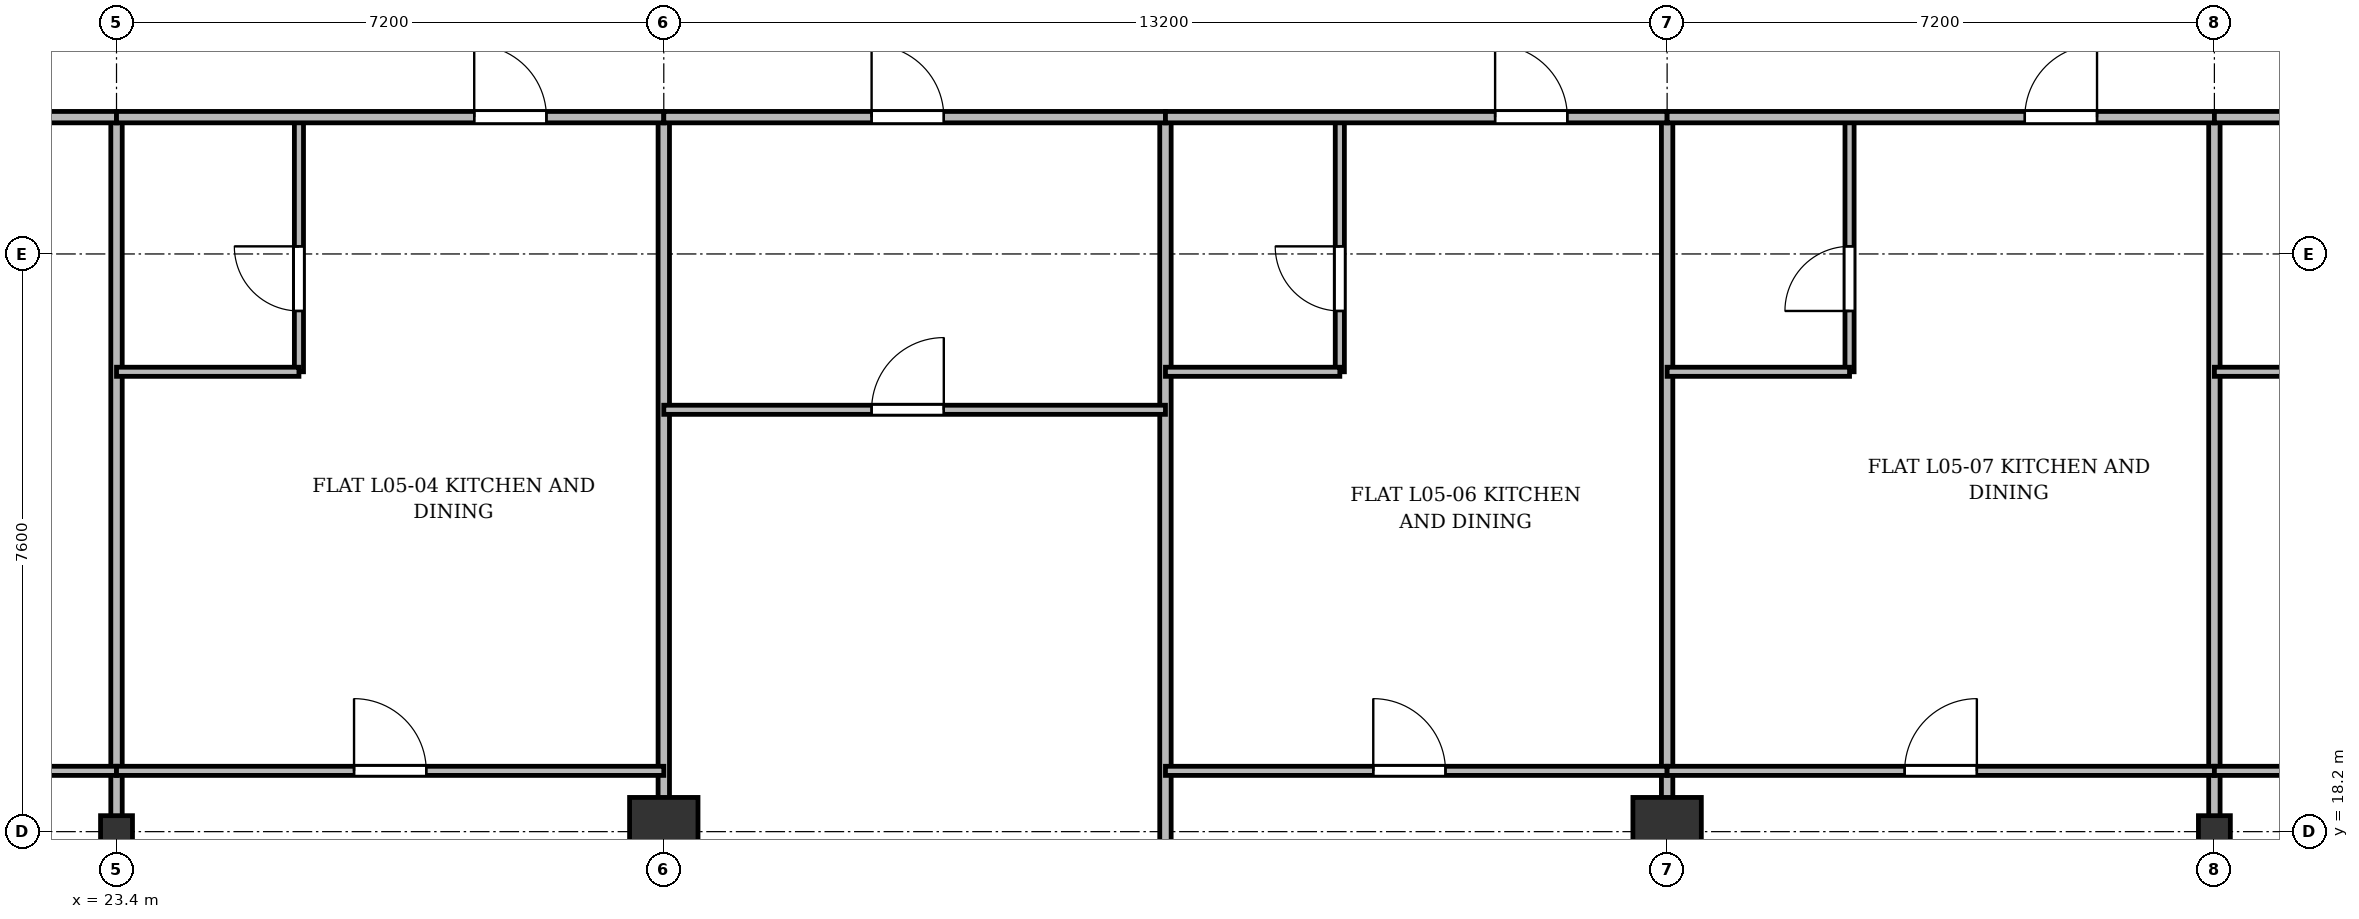
"""IFC4 building model, lengths in metres.
Left out: names, types, materials, properties, quantities, classifications, styles, units other than length and angle.
Written with IfcOpenShell. Run it as: python <this file> out.ifc"""

import sys

from ifc_helpers import new_model, si_unit, direction, frame, frame_2d, origin, origin_2d, place, context, subcontext, project, spatial, rectangle, i_section, extrude, source, transform, mapped, element, fill, save


model = new_model("IFC4")
c1 = context("Model", 3, precision=1e-05, world=origin(), true_north=direction((0.0, 1.0)))
c2 = subcontext(c1, "Body", "Model", "MODEL_VIEW")
j1 = project(units=[si_unit("LENGTHUNIT", "METRE"), si_unit("PLANEANGLEUNIT", "RADIAN")], contexts=[c1])
p1 = place(None, origin())
s1 = spatial("IfcSite", under=j1, at=p1, CompositionType="ELEMENT")
p2 = place(p1, origin())
s2 = spatial("IfcBuilding", under=s1, at=p2, CompositionType="ELEMENT")
p3 = place(p2, frame((0.0, 0.0, 23.5)))
s3 = spatial("IfcBuildingStorey", under=s2, at=p3, CompositionType="ELEMENT", Elevation=23.5)
m1 = source(origin(), c2, "Body", "SweptSolid", [
    extrude(i_section(OverallWidth=0.42, OverallDepth=0.42, WebThickness=0.026, FlangeThickness=0.04, at=origin_2d()), origin(), (0.0, 0.0, 1.0), 3.6),
])
p4 = place(p3, frame((23.4, 18.2, 0.0), z_axis=(0.0, 0.0, 1.0), x_axis=(1.0, 0.0, 0.0)))
e1 = element("IfcColumn", 1, at=p4, inside=s3, PredefinedType="COLUMN", context=c2, shape_type="MappedRepresentation", body=[
    mapped(m1, transform((0.0, 0.0, 0.0), x_axis=(1.0, 0.0, 0.0), y_axis=(0.0, 1.0, 0.0), z_axis=(0.0, 0.0, 1.0), scale=1.0)),
])
m2 = source(origin(), c2, "Body", "SweptSolid", [
    extrude(rectangle(XDim=0.9, YDim=0.9, at=origin_2d()), origin(), (0.0, 0.0, 1.0), 3.6),
])
for number, where, z_axis, x_axis in (
    (2, (30.6, 18.2, 0.0), (0.0, 0.0, 1.0), (1.0, 0.0, 0.0)),
    (3, (43.8, 18.2, 0.0), (0.0, 0.0, 1.0), (1.0, 0.0, 0.0)),
):
    element("IfcColumn", number, at=place(p3, frame(where, z_axis=z_axis, x_axis=x_axis)), inside=s3, PredefinedType="COLUMN", context=c2, shape_type="MappedRepresentation", body=[
        mapped(m2, transform((0.0, 0.0, 0.0), x_axis=(1.0, 0.0, 0.0), y_axis=(0.0, 1.0, 0.0), z_axis=(0.0, 0.0, 1.0), scale=1.0)),
    ])
p5 = place(p3, frame((51.0, 18.2, 0.0), z_axis=(0.0, 0.0, 1.0), x_axis=(1.0, 0.0, 0.0)))
e4 = element("IfcColumn", 4, at=p5, inside=s3, PredefinedType="COLUMN", context=c2, shape_type="MappedRepresentation", body=[
    mapped(m1, transform((0.0, 0.0, 0.0), x_axis=(1.0, 0.0, 0.0), y_axis=(0.0, 1.0, 0.0), z_axis=(0.0, 0.0, 1.0), scale=1.0)),
])
for number, where, z_axis, x_axis in (
    (5, (23.4, 3.145, 0.0), (0.0, 0.0, 1.0), (0.0, 1.0, 0.0)),
    (6, (30.6, 3.145, 0.0), (0.0, 0.0, 1.0), (0.0, 1.0, 0.0)),
):
    element("IfcWall", number, at=place(p3, frame(where, z_axis=z_axis, x_axis=x_axis)), inside=s3, PredefinedType="PARTITIONING", context=c2, shape_type="SweptSolid", body=[
        extrude(rectangle(XDim=24.455, YDim=0.15, at=frame_2d((12.228, 0.0))), origin(), (0.0, 0.0, 1.0), 2.752),
    ])
p6 = place(p3, frame((37.2, 3.145, 0.0), z_axis=(0.0, 0.0, 1.0), x_axis=(0.0, 1.0, 0.0)))
e7 = element("IfcWall", 7, at=p6, inside=s3, PredefinedType="PARTITIONING", context=c2, shape_type="SweptSolid", body=[
    extrude(rectangle(XDim=24.455, YDim=0.15, at=frame_2d((12.228, 0.0))), origin(), (0.0, 0.0, 1.0), 2.69),
])
for number, where, z_axis, x_axis in (
    (8, (43.8, 3.145, 0.0), (0.0, 0.0, 1.0), (0.0, 1.0, 0.0)),
    (9, (51.0, 3.145, 0.0), (0.0, 0.0, 1.0), (0.0, 1.0, 0.0)),
):
    element("IfcWall", number, at=place(p3, frame(where, z_axis=z_axis, x_axis=x_axis)), inside=s3, PredefinedType="PARTITIONING", context=c2, shape_type="SweptSolid", body=[
        extrude(rectangle(XDim=24.455, YDim=0.15, at=frame_2d((12.228, 0.0))), origin(), (0.0, 0.0, 1.0), 2.752),
    ])
p7 = place(p3, frame((15.6, 19.0, 0.0), z_axis=(0.0, 0.0, 1.0), x_axis=(1.0, 0.0, 0.0)))
e10 = element("IfcWall", 10, at=p7, inside=s3, PredefinedType="PARTITIONING", context=c2, shape_type="SweptSolid", body=[
    extrude(rectangle(XDim=7.8, YDim=0.12, at=frame_2d((3.9, 0.0))), origin(), (0.0, 0.0, 1.0), 2.752),
])
p8 = place(p7, frame((3.333, 0.0, 0.0)))
e11 = element("IfcOpeningElement", 11, at=p8, cuts=e10, PredefinedType="OPENING", context=c2, shape_type="SweptSolid", body=[
    extrude(rectangle(XDim=0.95, YDim=2.15, at=frame_2d((0.475, 1.075))), frame((0.0, 0.07, 0.0), z_axis=(0.0, -1.0, 0.0), x_axis=(1.0, 0.0, 0.0)), (0.0, 0.0, 1.0), 0.14),
])
p9 = place(p3, frame((15.6, 27.6, 0.0), z_axis=(0.0, 0.0, 1.0), x_axis=(1.0, 0.0, 0.0)))
e12 = element("IfcWall", 12, at=p9, inside=s3, PredefinedType="PARTITIONING", context=c2, shape_type="SweptSolid", body=[
    extrude(rectangle(XDim=7.8, YDim=0.15, at=frame_2d((3.9, 0.0))), origin(), (0.0, 0.0, 1.0), 2.752),
])
p10 = place(p9, frame((5.172, 0.0, 0.0)))
e13 = element("IfcOpeningElement", 13, at=p10, cuts=e12, PredefinedType="OPENING", context=c2, shape_type="SweptSolid", body=[
    extrude(rectangle(XDim=0.95, YDim=2.15, at=frame_2d((0.475, 1.075))), frame((0.0, 0.085, 0.0), z_axis=(0.0, -1.0, 0.0), x_axis=(1.0, 0.0, 0.0)), (0.0, 0.0, 1.0), 0.17),
])
p11 = place(p3, frame((23.4, 19.0, 0.0), z_axis=(0.0, 0.0, 1.0), x_axis=(1.0, 0.0, 0.0)))
e14 = element("IfcWall", 14, at=p11, inside=s3, PredefinedType="PARTITIONING", context=c2, shape_type="SweptSolid", body=[
    extrude(rectangle(XDim=7.2, YDim=0.12, at=frame_2d((3.6, 0.0))), origin(), (0.0, 0.0, 1.0), 2.752),
])
p12 = place(p11, frame((3.125, 0.0, 0.0)))
e15 = element("IfcOpeningElement", 15, at=p12, cuts=e14, PredefinedType="OPENING", context=c2, shape_type="SweptSolid", body=[
    extrude(rectangle(XDim=0.95, YDim=2.15, at=frame_2d((0.475, 1.075))), frame((0.0, 0.07, 0.0), z_axis=(0.0, -1.0, 0.0), x_axis=(1.0, 0.0, 0.0)), (0.0, 0.0, 1.0), 0.14),
])
p13 = place(p3, frame((25.8, 24.25, 0.0), z_axis=(0.0, 0.0, 1.0), x_axis=(0.0, 1.0, 0.0)))
e16 = element("IfcWall", 16, at=p13, inside=s3, PredefinedType="PARTITIONING", context=c2, shape_type="SweptSolid", body=[
    extrude(rectangle(XDim=3.35, YDim=0.12, at=frame_2d((1.675, 0.0))), origin(), (0.0, 0.0, 1.0), 2.94),
])
p14 = place(p13, frame((0.8, 0.0, 0.0)))
e17 = element("IfcOpeningElement", 17, at=p14, cuts=e16, PredefinedType="OPENING", context=c2, shape_type="SweptSolid", body=[
    extrude(rectangle(XDim=0.85, YDim=2.1, at=frame_2d((0.425, 1.05))), frame((0.0, 0.07, 0.0), z_axis=(0.0, -1.0, 0.0), x_axis=(1.0, 0.0, 0.0)), (0.0, 0.0, 1.0), 0.14),
])
p15 = place(p3, frame((23.4, 24.25, 0.0), z_axis=(0.0, 0.0, 1.0), x_axis=(1.0, 0.0, 0.0)))
e18 = element("IfcWall", 18, at=p15, inside=s3, PredefinedType="PARTITIONING", context=c2, shape_type="SweptSolid", body=[
    extrude(rectangle(XDim=2.4, YDim=0.12, at=frame_2d((1.2, 0.0))), origin(), (0.0, 0.0, 1.0), 2.752),
])
p16 = place(p3, frame((23.4, 27.6, 0.0), z_axis=(0.0, 0.0, 1.0), x_axis=(1.0, 0.0, 0.0)))
e19 = element("IfcWall", 19, at=p16, inside=s3, PredefinedType="PARTITIONING", context=c2, shape_type="SweptSolid", body=[
    extrude(rectangle(XDim=7.2, YDim=0.15, at=frame_2d((3.6, 0.0))), origin(), (0.0, 0.0, 1.0), 2.752),
])
p17 = place(p16, frame((4.706, 0.0, 0.0)))
e20 = element("IfcOpeningElement", 20, at=p17, cuts=e19, PredefinedType="OPENING", context=c2, shape_type="SweptSolid", body=[
    extrude(rectangle(XDim=0.95, YDim=2.15, at=frame_2d((0.475, 1.075))), frame((0.0, 0.085, 0.0), z_axis=(0.0, -1.0, 0.0), x_axis=(1.0, 0.0, 0.0)), (0.0, 0.0, 1.0), 0.17),
])
p18 = place(p3, frame((30.6, 27.6, 0.0), z_axis=(0.0, 0.0, 1.0), x_axis=(1.0, 0.0, 0.0)))
e21 = element("IfcWall", 21, at=p18, inside=s3, PredefinedType="PARTITIONING", context=c2, shape_type="SweptSolid", body=[
    extrude(rectangle(XDim=6.6, YDim=0.15, at=frame_2d((3.3, 0.0))), origin(), (0.0, 0.0, 1.0), 2.752),
])
p19 = place(p18, frame((2.734, 0.0, 0.0)))
e22 = element("IfcOpeningElement", 22, at=p19, cuts=e21, PredefinedType="OPENING", context=c2, shape_type="SweptSolid", body=[
    extrude(rectangle(XDim=0.95, YDim=2.15, at=frame_2d((0.475, 1.075))), frame((0.0, 0.085, 0.0), z_axis=(0.0, -1.0, 0.0), x_axis=(1.0, 0.0, 0.0)), (0.0, 0.0, 1.0), 0.17),
])
p20 = place(p3, frame((30.6, 23.75, 0.0), z_axis=(0.0, 0.0, 1.0), x_axis=(1.0, 0.0, 0.0)))
e23 = element("IfcWall", 23, at=p20, inside=s3, PredefinedType="PARTITIONING", context=c2, shape_type="SweptSolid", body=[
    extrude(rectangle(XDim=6.6, YDim=0.12, at=frame_2d((3.3, 0.0))), origin(), (0.0, 0.0, 1.0), 2.752),
])
p21 = place(p20, frame((2.734, 0.0, 0.0)))
e24 = element("IfcOpeningElement", 24, at=p21, cuts=e23, PredefinedType="OPENING", context=c2, shape_type="SweptSolid", body=[
    extrude(rectangle(XDim=0.95, YDim=2.15, at=frame_2d((0.475, 1.075))), frame((0.0, 0.07, 0.0), z_axis=(0.0, -1.0, 0.0), x_axis=(1.0, 0.0, 0.0)), (0.0, 0.0, 1.0), 0.14),
])
p22 = place(p3, frame((37.2, 19.0, 0.0), z_axis=(0.0, 0.0, 1.0), x_axis=(1.0, 0.0, 0.0)))
e25 = element("IfcWall", 25, at=p22, inside=s3, PredefinedType="PARTITIONING", context=c2, shape_type="SweptSolid", body=[
    extrude(rectangle(XDim=6.6, YDim=0.12, at=frame_2d((3.3, 0.0))), origin(), (0.0, 0.0, 1.0), 2.752),
])
p23 = place(p22, frame((2.734, 0.0, 0.0)))
e26 = element("IfcOpeningElement", 26, at=p23, cuts=e25, PredefinedType="OPENING", context=c2, shape_type="SweptSolid", body=[
    extrude(rectangle(XDim=0.95, YDim=2.15, at=frame_2d((0.475, 1.075))), frame((0.0, 0.07, 0.0), z_axis=(0.0, -1.0, 0.0), x_axis=(1.0, 0.0, 0.0)), (0.0, 0.0, 1.0), 0.14),
])
p24 = place(p3, frame((39.494, 24.25, 0.0), z_axis=(0.0, 0.0, 1.0), x_axis=(0.0, 1.0, 0.0)))
e27 = element("IfcWall", 27, at=p24, inside=s3, PredefinedType="PARTITIONING", context=c2, shape_type="SweptSolid", body=[
    extrude(rectangle(XDim=3.35, YDim=0.12, at=frame_2d((1.675, 0.0))), origin(), (0.0, 0.0, 1.0), 2.94),
])
p25 = place(p24, frame((0.8, 0.0, 0.0)))
e28 = element("IfcOpeningElement", 28, at=p25, cuts=e27, PredefinedType="OPENING", context=c2, shape_type="SweptSolid", body=[
    extrude(rectangle(XDim=0.85, YDim=2.1, at=frame_2d((0.425, 1.05))), frame((0.0, 0.07, 0.0), z_axis=(0.0, -1.0, 0.0), x_axis=(1.0, 0.0, 0.0)), (0.0, 0.0, 1.0), 0.14),
])
p26 = place(p3, frame((37.2, 24.25, 0.0), z_axis=(0.0, 0.0, 1.0), x_axis=(1.0, 0.0, 0.0)))
e29 = element("IfcWall", 29, at=p26, inside=s3, PredefinedType="PARTITIONING", context=c2, shape_type="SweptSolid", body=[
    extrude(rectangle(XDim=2.294, YDim=0.12, at=frame_2d((1.147, 0.0))), origin(), (0.0, 0.0, 1.0), 3.34),
])
p27 = place(p3, frame((37.2, 27.6, 0.0), z_axis=(0.0, 0.0, 1.0), x_axis=(1.0, 0.0, 0.0)))
e30 = element("IfcWall", 30, at=p27, inside=s3, PredefinedType="PARTITIONING", context=c2, shape_type="SweptSolid", body=[
    extrude(rectangle(XDim=6.6, YDim=0.15, at=frame_2d((3.3, 0.0))), origin(), (0.0, 0.0, 1.0), 2.752),
])
p28 = place(p27, frame((4.337, 0.0, 0.0)))
e31 = element("IfcOpeningElement", 31, at=p28, cuts=e30, PredefinedType="OPENING", context=c2, shape_type="SweptSolid", body=[
    extrude(rectangle(XDim=0.95, YDim=2.15, at=frame_2d((0.475, 1.075))), frame((0.0, 0.085, 0.0), z_axis=(0.0, -1.0, 0.0), x_axis=(1.0, 0.0, 0.0)), (0.0, 0.0, 1.0), 0.17),
])
p29 = place(p3, frame((43.8, 19.0, 0.0), z_axis=(0.0, 0.0, 1.0), x_axis=(1.0, 0.0, 0.0)))
e32 = element("IfcWall", 32, at=p29, inside=s3, PredefinedType="PARTITIONING", context=c2, shape_type="SweptSolid", body=[
    extrude(rectangle(XDim=7.2, YDim=0.12, at=frame_2d((3.6, 0.0))), origin(), (0.0, 0.0, 1.0), 2.752),
])
p30 = place(p29, frame((3.125, 0.0, 0.0)))
e33 = element("IfcOpeningElement", 33, at=p30, cuts=e32, PredefinedType="OPENING", context=c2, shape_type="SweptSolid", body=[
    extrude(rectangle(XDim=0.95, YDim=2.15, at=frame_2d((0.475, 1.075))), frame((0.0, 0.07, 0.0), z_axis=(0.0, -1.0, 0.0), x_axis=(1.0, 0.0, 0.0)), (0.0, 0.0, 1.0), 0.14),
])
p31 = place(p3, frame((46.2, 24.25, 0.0), z_axis=(0.0, 0.0, 1.0), x_axis=(0.0, 1.0, 0.0)))
e34 = element("IfcWall", 34, at=p31, inside=s3, PredefinedType="PARTITIONING", context=c2, shape_type="SweptSolid", body=[
    extrude(rectangle(XDim=3.35, YDim=0.12, at=frame_2d((1.675, 0.0))), origin(), (0.0, 0.0, 1.0), 2.94),
])
p32 = place(p31, frame((0.8, 0.0, 0.0)))
e35 = element("IfcOpeningElement", 35, at=p32, cuts=e34, PredefinedType="OPENING", context=c2, shape_type="SweptSolid", body=[
    extrude(rectangle(XDim=0.85, YDim=2.1, at=frame_2d((0.425, 1.05))), frame((0.0, 0.07, 0.0), z_axis=(0.0, -1.0, 0.0), x_axis=(1.0, 0.0, 0.0)), (0.0, 0.0, 1.0), 0.14),
])
p33 = place(p3, frame((43.8, 24.25, 0.0), z_axis=(0.0, 0.0, 1.0), x_axis=(1.0, 0.0, 0.0)))
e36 = element("IfcWall", 36, at=p33, inside=s3, PredefinedType="PARTITIONING", context=c2, shape_type="SweptSolid", body=[
    extrude(rectangle(XDim=2.4, YDim=0.12, at=frame_2d((1.2, 0.0))), origin(), (0.0, 0.0, 1.0), 2.752),
])
p34 = place(p3, frame((43.8, 27.6, 0.0), z_axis=(0.0, 0.0, 1.0), x_axis=(1.0, 0.0, 0.0)))
e37 = element("IfcWall", 37, at=p34, inside=s3, PredefinedType="PARTITIONING", context=c2, shape_type="SweptSolid", body=[
    extrude(rectangle(XDim=7.2, YDim=0.15, at=frame_2d((3.6, 0.0))), origin(), (0.0, 0.0, 1.0), 2.752),
])
p35 = place(p34, frame((4.706, 0.0, 0.0)))
e38 = element("IfcOpeningElement", 38, at=p35, cuts=e37, PredefinedType="OPENING", context=c2, shape_type="SweptSolid", body=[
    extrude(rectangle(XDim=0.95, YDim=2.15, at=frame_2d((0.475, 1.075))), frame((0.0, 0.085, 0.0), z_axis=(0.0, -1.0, 0.0), x_axis=(1.0, 0.0, 0.0)), (0.0, 0.0, 1.0), 0.17),
])
p36 = place(p3, frame((51.0, 19.0, 0.0), z_axis=(0.0, 0.0, 1.0), x_axis=(1.0, 0.0, 0.0)))
e39 = element("IfcWall", 39, at=p36, inside=s3, PredefinedType="PARTITIONING", context=c2, shape_type="SweptSolid", body=[
    extrude(rectangle(XDim=7.8, YDim=0.12, at=frame_2d((3.9, 0.0))), origin(), (0.0, 0.0, 1.0), 2.752),
])
p37 = place(p36, frame((3.333, 0.0, 0.0)))
e40 = element("IfcOpeningElement", 40, at=p37, cuts=e39, PredefinedType="OPENING", context=c2, shape_type="SweptSolid", body=[
    extrude(rectangle(XDim=0.95, YDim=2.15, at=frame_2d((0.475, 1.075))), frame((0.0, 0.07, 0.0), z_axis=(0.0, -1.0, 0.0), x_axis=(1.0, 0.0, 0.0)), (0.0, 0.0, 1.0), 0.14),
])
p38 = place(p3, frame((51.0, 24.25, 0.0), z_axis=(0.0, 0.0, 1.0), x_axis=(1.0, 0.0, 0.0)))
e41 = element("IfcWall", 41, at=p38, inside=s3, PredefinedType="PARTITIONING", context=c2, shape_type="SweptSolid", body=[
    extrude(rectangle(XDim=2.4, YDim=0.12, at=frame_2d((1.2, 0.0))), origin(), (0.0, 0.0, 1.0), 2.752),
])
p39 = place(p3, frame((51.0, 27.6, 0.0), z_axis=(0.0, 0.0, 1.0), x_axis=(1.0, 0.0, 0.0)))
e42 = element("IfcWall", 42, at=p39, inside=s3, PredefinedType="PARTITIONING", context=c2, shape_type="SweptSolid", body=[
    extrude(rectangle(XDim=7.8, YDim=0.15, at=frame_2d((3.9, 0.0))), origin(), (0.0, 0.0, 1.0), 2.752),
])
p40 = place(p39, frame((5.172, 0.0, 0.0)))
e43 = element("IfcOpeningElement", 43, at=p40, cuts=e42, PredefinedType="OPENING", context=c2, shape_type="SweptSolid", body=[
    extrude(rectangle(XDim=0.95, YDim=2.15, at=frame_2d((0.475, 1.075))), frame((0.0, 0.085, 0.0), z_axis=(0.0, -1.0, 0.0), x_axis=(1.0, 0.0, 0.0)), (0.0, 0.0, 1.0), 0.17),
])
m3 = source(origin(), c2, "Body", "SweptSolid", [
    extrude(rectangle(XDim=0.95, YDim=2.15, at=frame_2d((0.475, 1.075))), frame((0.0, 0.025, 0.0), z_axis=(0.0, -1.0, 0.0), x_axis=(1.0, 0.0, 0.0)), (0.0, 0.0, 1.0), 0.05),
])
p41 = place(p12, origin())
e44 = element("IfcDoor", 44, at=p41, inside=s3, OperationType="SINGLE_SWING_LEFT", PredefinedType="DOOR", context=c2, shape_type="MappedRepresentation", body=[
    mapped(m3, transform((0.0, 0.0, 0.0), x_axis=(1.0, 0.0, 0.0), y_axis=(0.0, 1.0, 0.0), z_axis=(0.0, 0.0, 1.0), scale=1.0)),
])
fill(e15, e44)
m4 = source(origin(), c2, "Body", "SweptSolid", [
    extrude(rectangle(XDim=0.85, YDim=2.1, at=frame_2d((0.425, 1.05))), frame((0.0, 0.025, 0.0), z_axis=(0.0, -1.0, 0.0), x_axis=(1.0, 0.0, 0.0)), (0.0, 0.0, 1.0), 0.05),
])
p42 = place(p14, origin())
e45 = element("IfcDoor", 45, at=p42, inside=s3, OperationType="SINGLE_SWING_RIGHT", PredefinedType="DOOR", context=c2, shape_type="MappedRepresentation", body=[
    mapped(m4, transform((0.0, 0.0, 0.0), x_axis=(1.0, 0.0, 0.0), y_axis=(0.0, 1.0, 0.0), z_axis=(0.0, 0.0, 1.0), scale=1.0)),
])
fill(e17, e45)
p43 = place(p17, origin())
e46 = element("IfcDoor", 46, at=p43, inside=s3, OperationType="SINGLE_SWING_LEFT", PredefinedType="DOOR", context=c2, shape_type="MappedRepresentation", body=[
    mapped(m3, transform((0.0, 0.0, 0.0), x_axis=(1.0, 0.0, 0.0), y_axis=(0.0, 1.0, 0.0), z_axis=(0.0, 0.0, 1.0), scale=1.0)),
])
fill(e20, e46)
p44 = place(p19, origin())
e47 = element("IfcDoor", 47, at=p44, inside=s3, OperationType="SINGLE_SWING_LEFT", PredefinedType="DOOR", context=c2, shape_type="MappedRepresentation", body=[
    mapped(m3, transform((0.0, 0.0, 0.0), x_axis=(1.0, 0.0, 0.0), y_axis=(0.0, 1.0, 0.0), z_axis=(0.0, 0.0, 1.0), scale=1.0)),
])
fill(e22, e47)
p45 = place(p21, origin())
e48 = element("IfcDoor", 48, at=p45, inside=s3, OperationType="SINGLE_SWING_RIGHT", PredefinedType="DOOR", context=c2, shape_type="MappedRepresentation", body=[
    mapped(m3, transform((0.0, 0.0, 0.0), x_axis=(1.0, 0.0, 0.0), y_axis=(0.0, 1.0, 0.0), z_axis=(0.0, 0.0, 1.0), scale=1.0)),
])
fill(e24, e48)
p46 = place(p23, origin())
e49 = element("IfcDoor", 49, at=p46, inside=s3, OperationType="SINGLE_SWING_LEFT", PredefinedType="DOOR", context=c2, shape_type="MappedRepresentation", body=[
    mapped(m3, transform((0.0, 0.0, 0.0), x_axis=(1.0, 0.0, 0.0), y_axis=(0.0, 1.0, 0.0), z_axis=(0.0, 0.0, 1.0), scale=1.0)),
])
fill(e26, e49)
p47 = place(p25, origin())
e50 = element("IfcDoor", 50, at=p47, inside=s3, OperationType="SINGLE_SWING_RIGHT", PredefinedType="DOOR", context=c2, shape_type="MappedRepresentation", body=[
    mapped(m4, transform((0.0, 0.0, 0.0), x_axis=(1.0, 0.0, 0.0), y_axis=(0.0, 1.0, 0.0), z_axis=(0.0, 0.0, 1.0), scale=1.0)),
])
fill(e28, e50)
p48 = place(p28, origin())
e51 = element("IfcDoor", 51, at=p48, inside=s3, OperationType="SINGLE_SWING_LEFT", PredefinedType="DOOR", context=c2, shape_type="MappedRepresentation", body=[
    mapped(m3, transform((0.0, 0.0, 0.0), x_axis=(1.0, 0.0, 0.0), y_axis=(0.0, 1.0, 0.0), z_axis=(0.0, 0.0, 1.0), scale=1.0)),
])
fill(e31, e51)
p49 = place(p30, origin())
e52 = element("IfcDoor", 52, at=p49, inside=s3, OperationType="SINGLE_SWING_RIGHT", PredefinedType="DOOR", context=c2, shape_type="MappedRepresentation", body=[
    mapped(m3, transform((0.0, 0.0, 0.0), x_axis=(1.0, 0.0, 0.0), y_axis=(0.0, 1.0, 0.0), z_axis=(0.0, 0.0, 1.0), scale=1.0)),
])
fill(e33, e52)
p50 = place(p32, origin())
e53 = element("IfcDoor", 53, at=p50, inside=s3, OperationType="SINGLE_SWING_LEFT", PredefinedType="DOOR", context=c2, shape_type="MappedRepresentation", body=[
    mapped(m4, transform((0.0, 0.0, 0.0), x_axis=(1.0, 0.0, 0.0), y_axis=(0.0, 1.0, 0.0), z_axis=(0.0, 0.0, 1.0), scale=1.0)),
])
fill(e35, e53)
p51 = place(p35, origin())
e54 = element("IfcDoor", 54, at=p51, inside=s3, OperationType="SINGLE_SWING_RIGHT", PredefinedType="DOOR", context=c2, shape_type="MappedRepresentation", body=[
    mapped(m3, transform((0.0, 0.0, 0.0), x_axis=(1.0, 0.0, 0.0), y_axis=(0.0, 1.0, 0.0), z_axis=(0.0, 0.0, 1.0), scale=1.0)),
])
fill(e38, e54)
save(model, sys.argv[1])
